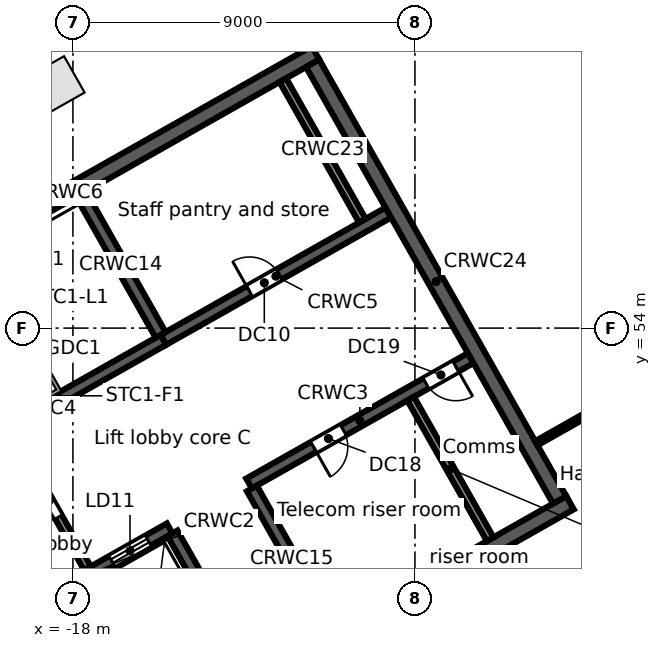
"""IFC4 building model, lengths in metres.
Left out: names, types, materials, properties, quantities, classifications, styles, units other than length and angle.
Written with IfcOpenShell. Run it as: python <this file> out.ifc"""

import sys

from ifc_helpers import new_model, si_unit, direction, frame, frame_2d, origin, origin_2d, place, context, subcontext, project, spatial, rectangle, extrude, element, fill, save


model = new_model("IFC4")
c1 = context("Model", 3, precision=1e-05, world=origin(), true_north=direction((0.0, 1.0)))
c2 = subcontext(c1, "Body", "Model", "MODEL_VIEW")
j1 = project(units=[si_unit("LENGTHUNIT", "METRE"), si_unit("PLANEANGLEUNIT", "RADIAN")], contexts=[c1])
p1 = place(None, origin())
s1 = spatial("IfcSite", under=j1, at=p1, CompositionType="ELEMENT")
p2 = place(p1, origin())
s2 = spatial("IfcBuilding", under=s1, at=p2, CompositionType="ELEMENT")
p3 = place(p2, frame((0.0, 0.0, 274.1)))
s3 = spatial("IfcBuildingStorey", under=s2, at=p3, CompositionType="ELEMENT", Elevation=274.1)
p4 = place(p3, frame((-18.441, 60.406, 0.0), z_axis=(0.0, 0.0, 1.0), x_axis=(-0.87035569594, -0.492423560103, 0.0)))
e1 = element("IfcColumn", 1, at=p4, inside=s3, PredefinedType="COLUMN", context=c2, shape_type="SweptSolid", body=[
    extrude(rectangle(XDim=1.1, YDim=1.1, at=origin_2d()), origin(), (0.0, 0.0, 1.0), 3.8),
])
p5 = place(p3, frame((-58.732, 38.771, 0.0), z_axis=(0.0, 0.0, 1.0), x_axis=(0.870355615581, 0.492423702137, 0.0)))
e2 = element("IfcWall", 2, at=p5, inside=s3, PredefinedType="STANDARD", context=c2, shape_type="SweptSolid", body=[
    extrude(rectangle(XDim=64.052, YDim=0.25, at=frame_2d((32.026, 0.0))), origin(), (0.0, 0.0, 1.0), 3.52),
])
p6 = place(p5, frame((61.259, 0.0, 0.8)))
e3 = element("IfcOpeningElement", 3, at=p6, cuts=e2, PredefinedType="OPENING", context=c2, shape_type="SweptSolid", body=[
    extrude(rectangle(XDim=2.4, YDim=2.2, at=frame_2d((1.2, 1.1))), frame((0.0, 0.135, 0.0), z_axis=(0.0, -1.0, 0.0), x_axis=(1.0, 0.0, 0.0)), (0.0, 0.0, 1.0), 0.27),
])
p7 = place(p5, frame((58.216, 0.0, 0.8)))
e4 = element("IfcOpeningElement", 4, at=p7, cuts=e2, PredefinedType="OPENING", context=c2, shape_type="SweptSolid", body=[
    extrude(rectangle(XDim=2.4, YDim=2.2, at=frame_2d((1.2, 1.1))), frame((0.0, 0.135, 0.0), z_axis=(0.0, -1.0, 0.0), x_axis=(1.0, 0.0, 0.0)), (0.0, 0.0, 1.0), 0.27),
])
p8 = place(p5, frame((55.173, 0.0, 0.8)))
e5 = element("IfcOpeningElement", 5, at=p8, cuts=e2, PredefinedType="OPENING", context=c2, shape_type="SweptSolid", body=[
    extrude(rectangle(XDim=2.4, YDim=2.2, at=frame_2d((1.2, 1.1))), frame((0.0, 0.135, 0.0), z_axis=(0.0, -1.0, 0.0), x_axis=(1.0, 0.0, 0.0)), (0.0, 0.0, 1.0), 0.27),
])
p9 = place(p5, frame((52.129, 0.0, 0.8)))
e6 = element("IfcOpeningElement", 6, at=p9, cuts=e2, PredefinedType="OPENING", context=c2, shape_type="SweptSolid", body=[
    extrude(rectangle(XDim=2.4, YDim=2.2, at=frame_2d((1.2, 1.1))), frame((0.0, 0.135, 0.0), z_axis=(0.0, -1.0, 0.0), x_axis=(1.0, 0.0, 0.0)), (0.0, 0.0, 1.0), 0.27),
])
p10 = place(p5, frame((49.086, 0.0, 0.8)))
e7 = element("IfcOpeningElement", 7, at=p10, cuts=e2, PredefinedType="OPENING", context=c2, shape_type="SweptSolid", body=[
    extrude(rectangle(XDim=2.4, YDim=2.2, at=frame_2d((1.2, 1.1))), frame((0.0, 0.135, 0.0), z_axis=(0.0, -1.0, 0.0), x_axis=(1.0, 0.0, 0.0)), (0.0, 0.0, 1.0), 0.27),
])
p11 = place(p5, frame((46.043, 0.0, 0.8)))
e8 = element("IfcOpeningElement", 8, at=p11, cuts=e2, PredefinedType="OPENING", context=c2, shape_type="SweptSolid", body=[
    extrude(rectangle(XDim=2.4, YDim=2.2, at=frame_2d((1.2, 1.1))), frame((0.0, 0.135, 0.0), z_axis=(0.0, -1.0, 0.0), x_axis=(1.0, 0.0, 0.0)), (0.0, 0.0, 1.0), 0.27),
])
p12 = place(p5, frame((43.0, 0.0, 0.8)))
e9 = element("IfcOpeningElement", 9, at=p12, cuts=e2, PredefinedType="OPENING", context=c2, shape_type="SweptSolid", body=[
    extrude(rectangle(XDim=2.4, YDim=2.2, at=frame_2d((1.2, 1.1))), frame((0.0, 0.135, 0.0), z_axis=(0.0, -1.0, 0.0), x_axis=(1.0, 0.0, 0.0)), (0.0, 0.0, 1.0), 0.27),
])
p13 = place(p5, frame((39.956, 0.0, 0.8)))
e10 = element("IfcOpeningElement", 10, at=p13, cuts=e2, PredefinedType="OPENING", context=c2, shape_type="SweptSolid", body=[
    extrude(rectangle(XDim=2.4, YDim=2.2, at=frame_2d((1.2, 1.1))), frame((0.0, 0.135, 0.0), z_axis=(0.0, -1.0, 0.0), x_axis=(1.0, 0.0, 0.0)), (0.0, 0.0, 1.0), 0.27),
])
p14 = place(p5, frame((36.913, 0.0, 0.8)))
e11 = element("IfcOpeningElement", 11, at=p14, cuts=e2, PredefinedType="OPENING", context=c2, shape_type="SweptSolid", body=[
    extrude(rectangle(XDim=2.4, YDim=2.2, at=frame_2d((1.2, 1.1))), frame((0.0, 0.135, 0.0), z_axis=(0.0, -1.0, 0.0), x_axis=(1.0, 0.0, 0.0)), (0.0, 0.0, 1.0), 0.27),
])
p15 = place(p5, frame((33.87, 0.0, 0.8)))
e12 = element("IfcOpeningElement", 12, at=p15, cuts=e2, PredefinedType="OPENING", context=c2, shape_type="SweptSolid", body=[
    extrude(rectangle(XDim=2.4, YDim=2.2, at=frame_2d((1.2, 1.1))), frame((0.0, 0.135, 0.0), z_axis=(0.0, -1.0, 0.0), x_axis=(1.0, 0.0, 0.0)), (0.0, 0.0, 1.0), 0.27),
])
p16 = place(p5, frame((30.826, 0.0, 0.8)))
e13 = element("IfcOpeningElement", 13, at=p16, cuts=e2, PredefinedType="OPENING", context=c2, shape_type="SweptSolid", body=[
    extrude(rectangle(XDim=2.4, YDim=2.2, at=frame_2d((1.2, 1.1))), frame((0.0, 0.135, 0.0), z_axis=(0.0, -1.0, 0.0), x_axis=(1.0, 0.0, 0.0)), (0.0, 0.0, 1.0), 0.27),
])
p17 = place(p5, frame((27.783, 0.0, 0.8)))
e14 = element("IfcOpeningElement", 14, at=p17, cuts=e2, PredefinedType="OPENING", context=c2, shape_type="SweptSolid", body=[
    extrude(rectangle(XDim=2.4, YDim=2.2, at=frame_2d((1.2, 1.1))), frame((0.0, 0.135, 0.0), z_axis=(0.0, -1.0, 0.0), x_axis=(1.0, 0.0, 0.0)), (0.0, 0.0, 1.0), 0.27),
])
p18 = place(p5, frame((24.74, 0.0, 0.8)))
e15 = element("IfcOpeningElement", 15, at=p18, cuts=e2, PredefinedType="OPENING", context=c2, shape_type="SweptSolid", body=[
    extrude(rectangle(XDim=2.4, YDim=2.2, at=frame_2d((1.2, 1.1))), frame((0.0, 0.135, 0.0), z_axis=(0.0, -1.0, 0.0), x_axis=(1.0, 0.0, 0.0)), (0.0, 0.0, 1.0), 0.27),
])
p19 = place(p5, frame((21.696, 0.0, 0.8)))
e16 = element("IfcOpeningElement", 16, at=p19, cuts=e2, PredefinedType="OPENING", context=c2, shape_type="SweptSolid", body=[
    extrude(rectangle(XDim=2.4, YDim=2.2, at=frame_2d((1.2, 1.1))), frame((0.0, 0.135, 0.0), z_axis=(0.0, -1.0, 0.0), x_axis=(1.0, 0.0, 0.0)), (0.0, 0.0, 1.0), 0.27),
])
p20 = place(p5, frame((18.653, 0.0, 0.8)))
e17 = element("IfcOpeningElement", 17, at=p20, cuts=e2, PredefinedType="OPENING", context=c2, shape_type="SweptSolid", body=[
    extrude(rectangle(XDim=2.4, YDim=2.2, at=frame_2d((1.2, 1.1))), frame((0.0, 0.135, 0.0), z_axis=(0.0, -1.0, 0.0), x_axis=(1.0, 0.0, 0.0)), (0.0, 0.0, 1.0), 0.27),
])
p21 = place(p5, frame((15.61, 0.0, 0.8)))
e18 = element("IfcOpeningElement", 18, at=p21, cuts=e2, PredefinedType="OPENING", context=c2, shape_type="SweptSolid", body=[
    extrude(rectangle(XDim=2.4, YDim=2.2, at=frame_2d((1.2, 1.1))), frame((0.0, 0.135, 0.0), z_axis=(0.0, -1.0, 0.0), x_axis=(1.0, 0.0, 0.0)), (0.0, 0.0, 1.0), 0.27),
])
p22 = place(p5, frame((12.567, 0.0, 0.8)))
e19 = element("IfcOpeningElement", 19, at=p22, cuts=e2, PredefinedType="OPENING", context=c2, shape_type="SweptSolid", body=[
    extrude(rectangle(XDim=2.4, YDim=2.2, at=frame_2d((1.2, 1.1))), frame((0.0, 0.135, 0.0), z_axis=(0.0, -1.0, 0.0), x_axis=(1.0, 0.0, 0.0)), (0.0, 0.0, 1.0), 0.27),
])
p23 = place(p5, frame((9.523, 0.0, 0.8)))
e20 = element("IfcOpeningElement", 20, at=p23, cuts=e2, PredefinedType="OPENING", context=c2, shape_type="SweptSolid", body=[
    extrude(rectangle(XDim=2.4, YDim=2.2, at=frame_2d((1.2, 1.1))), frame((0.0, 0.135, 0.0), z_axis=(0.0, -1.0, 0.0), x_axis=(1.0, 0.0, 0.0)), (0.0, 0.0, 1.0), 0.27),
])
p24 = place(p5, frame((6.48, 0.0, 0.8)))
e21 = element("IfcOpeningElement", 21, at=p24, cuts=e2, PredefinedType="OPENING", context=c2, shape_type="SweptSolid", body=[
    extrude(rectangle(XDim=2.4, YDim=2.2, at=frame_2d((1.2, 1.1))), frame((0.0, 0.135, 0.0), z_axis=(0.0, -1.0, 0.0), x_axis=(1.0, 0.0, 0.0)), (0.0, 0.0, 1.0), 0.27),
])
p25 = place(p5, frame((3.437, 0.0, 0.8)))
e22 = element("IfcOpeningElement", 22, at=p25, cuts=e2, PredefinedType="OPENING", context=c2, shape_type="SweptSolid", body=[
    extrude(rectangle(XDim=2.4, YDim=2.2, at=frame_2d((1.2, 1.1))), frame((0.0, 0.135, 0.0), z_axis=(0.0, -1.0, 0.0), x_axis=(1.0, 0.0, 0.0)), (0.0, 0.0, 1.0), 0.27),
])
p26 = place(p5, frame((0.393, 0.0, 0.8)))
e23 = element("IfcOpeningElement", 23, at=p26, cuts=e2, PredefinedType="OPENING", context=c2, shape_type="SweptSolid", body=[
    extrude(rectangle(XDim=2.4, YDim=2.2, at=frame_2d((1.2, 1.1))), frame((0.0, 0.135, 0.0), z_axis=(0.0, -1.0, 0.0), x_axis=(1.0, 0.0, 0.0)), (0.0, 0.0, 1.0), 0.27),
])
p27 = place(p3, frame((-17.975, 42.017, 0.0), z_axis=(0.0, 0.0, 1.0), x_axis=(0.87034965173, 0.492434243055, 0.0)))
e24 = element("IfcWall", 24, at=p27, inside=s3, PredefinedType="SOLIDWALL", context=c2, shape_type="SweptSolid", body=[
    extrude(rectangle(XDim=15.0, YDim=0.4, at=frame_2d((7.5, 0.0))), origin(), (0.0, 0.0, 1.0), 3.52),
])
p28 = place(p27, frame((6.1, 0.0, 0.0)))
e25 = element("IfcOpeningElement", 25, at=p28, cuts=e24, PredefinedType="OPENING", context=c2, shape_type="SweptSolid", body=[
    extrude(rectangle(XDim=1.2, YDim=2.1, at=frame_2d((0.6, 1.05))), frame((0.0, 0.21, 0.0), z_axis=(0.0, -1.0, 0.0), x_axis=(1.0, 0.0, 0.0)), (0.0, 0.0, 1.0), 0.42),
])
p29 = place(p3, frame((-19.892, 46.218, 0.0), z_axis=(0.0, 0.0, 1.0), x_axis=(0.870341639186, 0.492448404505, 0.0)))
e26 = element("IfcWall", 26, at=p29, inside=s3, PredefinedType="SOLIDWALL", context=c2, shape_type="SweptSolid", body=[
    extrude(rectangle(XDim=5.1, YDim=0.3, at=frame_2d((2.55, 0.0))), origin(), (0.0, 0.0, 1.0), 3.52),
])
p30 = place(p29, frame((0.75, 0.0, 0.0)))
e27 = element("IfcOpeningElement", 27, at=p30, cuts=e26, PredefinedType="OPENING", context=c2, shape_type="SweptSolid", body=[
    extrude(rectangle(XDim=1.1, YDim=2.1, at=frame_2d((0.55, 1.05))), frame((0.0, 0.16, 0.0), z_axis=(0.0, -1.0, 0.0), x_axis=(1.0, 0.0, 0.0)), (0.0, 0.0, 1.0), 0.32),
])
p31 = place(p29, frame((3.35, 0.0, 0.0)))
e28 = element("IfcOpeningElement", 28, at=p31, cuts=e26, PredefinedType="OPENING", context=c2, shape_type="SweptSolid", body=[
    extrude(rectangle(XDim=1.1, YDim=2.1, at=frame_2d((0.55, 1.05))), frame((0.0, 0.16, 0.0), z_axis=(0.0, -1.0, 0.0), x_axis=(1.0, 0.0, 0.0)), (0.0, 0.0, 1.0), 0.32),
])
p32 = place(p3, frame((-13.365, 49.911, 0.0), z_axis=(0.0, 0.0, 1.0), x_axis=(0.870347618718, 0.492437836272, 0.0)))
e29 = element("IfcWall", 29, at=p32, inside=s3, PredefinedType="SOLIDWALL", context=c2, shape_type="SweptSolid", body=[
    extrude(rectangle(XDim=6.7, YDim=0.3, at=frame_2d((3.35, 0.0))), origin(), (0.0, 0.0, 1.0), 3.52),
])
p33 = place(p32, frame((1.95, 0.0, 0.0)))
e30 = element("IfcOpeningElement", 30, at=p33, cuts=e29, PredefinedType="OPENING", context=c2, shape_type="SweptSolid", body=[
    extrude(rectangle(XDim=0.9, YDim=2.1, at=frame_2d((0.45, 1.05))), frame((0.0, 0.16, 0.0), z_axis=(0.0, -1.0, 0.0), x_axis=(1.0, 0.0, 0.0)), (0.0, 0.0, 1.0), 0.32),
])
p34 = place(p32, frame((5.35, 0.0, 0.0)))
e31 = element("IfcOpeningElement", 31, at=p34, cuts=e29, PredefinedType="OPENING", context=c2, shape_type="SweptSolid", body=[
    extrude(rectangle(XDim=0.9, YDim=2.1, at=frame_2d((0.45, 1.05))), frame((0.0, 0.16, 0.0), z_axis=(0.0, -1.0, 0.0), x_axis=(1.0, 0.0, 0.0)), (0.0, 0.0, 1.0), 0.32),
])
p35 = place(p3, frame((-22.059, 50.047, 0.0), z_axis=(0.0, 0.0, 1.0), x_axis=(0.87035077051, 0.49243226567, 0.0)))
e32 = element("IfcWall", 32, at=p35, inside=s3, PredefinedType="SOLIDWALL", context=c2, shape_type="SweptSolid", body=[
    extrude(rectangle(XDim=7.4, YDim=0.3, at=frame_2d((3.7, 0.0))), origin(), (0.0, 0.0, 1.0), 3.52),
])
p36 = place(p35, frame((0.4, 0.0, 0.0)))
e33 = element("IfcOpeningElement", 33, at=p36, cuts=e32, PredefinedType="OPENING", context=c2, shape_type="SweptSolid", body=[
    extrude(rectangle(XDim=1.0, YDim=2.1, at=frame_2d((0.5, 1.05))), frame((0.0, 0.16, 0.0), z_axis=(0.0, -1.0, 0.0), x_axis=(1.0, 0.0, 0.0)), (0.0, 0.0, 1.0), 0.32),
])
p37 = place(p3, frame((-15.618, 53.691, 0.0), z_axis=(0.0, 0.0, 1.0), x_axis=(0.870362830851, 0.492410948978, 0.0)))
e34 = element("IfcWall", 34, at=p37, inside=s3, PredefinedType="SOLIDWALL", context=c2, shape_type="SweptSolid", body=[
    extrude(rectangle(XDim=6.8, YDim=0.3, at=frame_2d((3.4, 0.0))), origin(), (0.0, 0.0, 1.0), 3.52),
])
p38 = place(p37, frame((2.6, 0.0, 0.0)))
e35 = element("IfcOpeningElement", 35, at=p38, cuts=e34, PredefinedType="OPENING", context=c2, shape_type="SweptSolid", body=[
    extrude(rectangle(XDim=0.9, YDim=2.1, at=frame_2d((0.45, 1.05))), frame((0.0, 0.16, 0.0), z_axis=(0.0, -1.0, 0.0), x_axis=(1.0, 0.0, 0.0)), (0.0, 0.0, 1.0), 0.32),
])
p39 = place(p3, frame((-24.672, 53.854, 0.0), z_axis=(0.0, 0.0, 1.0), x_axis=(0.870353598469, 0.492427267353, 0.0)))
e36 = element("IfcWall", 36, at=p39, inside=s3, PredefinedType="SOLIDWALL", context=c2, shape_type="SweptSolid", body=[
    extrude(rectangle(XDim=15.0, YDim=0.4, at=frame_2d((7.5, 0.0))), origin(), (0.0, 0.0, 1.0), 3.52),
])
p40 = place(p3, frame((-24.4, 53.779, 0.0), z_axis=(0.0, 0.0, 1.0), x_axis=(0.492421663121, -0.870356769198, 0.0)))
e37 = element("IfcWall", 37, at=p40, inside=s3, PredefinedType="SOLIDWALL", context=c2, shape_type="SweptSolid", body=[
    extrude(rectangle(XDim=13.2, YDim=0.4, at=frame_2d((6.6, 0.0))), origin(), (0.0, 0.0, 1.0), 3.52),
])
p41 = place(p3, frame((-19.635, 51.246, 0.0), z_axis=(0.0, 0.0, 1.0), x_axis=(0.492408451753, -0.87036424366, 0.0)))
e38 = element("IfcWall", 38, at=p41, inside=s3, PredefinedType="PARTITIONING", context=c2, shape_type="SweptSolid", body=[
    extrude(rectangle(XDim=4.1, YDim=0.2, at=frame_2d((2.05, 0.0))), origin(), (0.0, 0.0, 1.0), 3.52),
])
p42 = place(p41, frame((1.55, 0.0, 0.0)))
e39 = element("IfcOpeningElement", 39, at=p42, cuts=e38, PredefinedType="OPENING", context=c2, shape_type="SweptSolid", body=[
    extrude(rectangle(XDim=1.0, YDim=2.1, at=frame_2d((0.5, 1.05))), frame((0.0, 0.11, 0.0), z_axis=(0.0, -1.0, 0.0), x_axis=(1.0, 0.0, 0.0)), (0.0, 0.0, 1.0), 0.22),
])
for number, where, z_axis, x_axis in (
    (40, (-15.379, 48.599, 0.0), (0.0, 0.0, 1.0), (0.492, -0.87, 0.0)),
    (41, (-17.785, 57.521, 0.0), (0.0, 0.0, 1.0), (0.492, -0.87, 0.0)),
):
    element("IfcWall", number, at=place(p3, frame(where, z_axis=z_axis, x_axis=x_axis)), inside=s3, PredefinedType="SOLIDWALL", context=c2, shape_type="SweptSolid", body=[
        extrude(rectangle(XDim=4.25, YDim=0.3, at=frame_2d((2.125, 0.0))), origin(), (0.0, 0.0, 1.0), 3.52),
    ])
p43 = place(p3, frame((-13.291, 49.781, 0.0), z_axis=(0.0, 0.0, 1.0), x_axis=(0.492397924348, -0.870370199454, 0.0)))
e42 = element("IfcWall", 42, at=p43, inside=s3, PredefinedType="SOLIDWALL", context=c2, shape_type="SweptSolid", body=[
    extrude(rectangle(XDim=4.25, YDim=0.3, at=frame_2d((2.125, 0.0))), origin(), (0.0, 0.0, 1.0), 3.52),
])
p44 = place(p3, frame((-9.113, 52.144, 0.0), z_axis=(0.0, 0.0, 1.0), x_axis=(0.492422543467, -0.870356271124, 0.0)))
e43 = element("IfcWall", 43, at=p44, inside=s3, PredefinedType="PARTITIONING", context=c2, shape_type="SweptSolid", body=[
    extrude(rectangle(XDim=4.25, YDim=0.2, at=frame_2d((2.125, 0.0))), origin(), (0.0, 0.0, 1.0), 3.52),
])
p45 = place(p3, frame((-12.476, 60.525, 0.0), z_axis=(0.0, 0.0, 1.0), x_axis=(0.492422543467, -0.870356271124, 0.0)))
e44 = element("IfcWall", 44, at=p45, inside=s3, PredefinedType="SOLIDWALL", context=c2, shape_type="SweptSolid", body=[
    extrude(rectangle(XDim=4.25, YDim=0.2, at=frame_2d((2.125, 0.0))), origin(), (0.0, 0.0, 1.0), 3.52),
])
p46 = place(p3, frame((-11.692, 60.968, 0.0), z_axis=(0.0, 0.0, 1.0), x_axis=(0.492421663121, -0.870356769198, 0.0)))
e45 = element("IfcWall", 45, at=p46, inside=s3, PredefinedType="SOLIDWALL", context=c2, shape_type="SweptSolid", body=[
    extrude(rectangle(XDim=13.2, YDim=0.4, at=frame_2d((6.6, 0.0))), origin(), (0.0, 0.0, 1.0), 3.52),
])
p47 = place(p3, frame((-5.806, 50.97, 0.0), z_axis=(0.0, 0.0, 1.0), x_axis=(0.870355163327, 0.492424501492, 0.0)))
e46 = element("IfcWall", 46, at=p47, inside=s3, PredefinedType="PARTITIONING", context=c2, shape_type="SweptSolid", body=[
    extrude(rectangle(XDim=6.527, YDim=0.125, at=frame_2d((3.264, 0.0))), origin(), (0.0, 0.0, 1.0), 2.8),
])
p48 = place(p47, frame((2.45, 0.0, 0.0)))
e47 = element("IfcOpeningElement", 47, at=p48, cuts=e46, PredefinedType="OPENING", context=c2, shape_type="SweptSolid", body=[
    extrude(rectangle(XDim=1.8, YDim=2.1, at=frame_2d((0.9, 1.05))), frame((0.0, 0.073, 0.0), z_axis=(0.0, -1.0, 0.0), x_axis=(1.0, 0.0, 0.0)), (0.0, 0.0, 1.0), 0.145),
])
p49 = place(p31, origin())
e48 = element("IfcDoor", 48, at=p49, inside=s3, OperationType="DOUBLE_DOOR_SLIDING", PredefinedType="DOOR", context=c2, shape_type="SweptSolid", body=[
    extrude(rectangle(XDim=1.1, YDim=2.1, at=frame_2d((0.55, 1.05))), frame((0.0, 0.025, 0.0), z_axis=(0.0, -1.0, 0.0), x_axis=(1.0, 0.0, 0.0)), (0.0, 0.0, 1.0), 0.05),
])
fill(e28, e48)
p50 = place(p42, frame((1.0, 0.0, 0.0), z_axis=(0.0, 0.0, 1.0), x_axis=(-1.0, 0.0, 0.0)))
e49 = element("IfcDoor", 49, at=p50, inside=s3, OperationType="SINGLE_SWING_RIGHT", PredefinedType="DOOR", context=c2, shape_type="SweptSolid", body=[
    extrude(rectangle(XDim=1.0, YDim=2.1, at=frame_2d((0.5, 1.05))), frame((0.0, 0.025, 0.0), z_axis=(0.0, -1.0, 0.0), x_axis=(1.0, 0.0, 0.0)), (0.0, 0.0, 1.0), 0.05),
])
fill(e39, e49)
p51 = place(p38, origin())
e50 = element("IfcDoor", 50, at=p51, inside=s3, OperationType="SINGLE_SWING_LEFT", PredefinedType="DOOR", context=c2, shape_type="SweptSolid", body=[
    extrude(rectangle(XDim=0.9, YDim=2.1, at=frame_2d((0.45, 1.05))), frame((0.0, 0.025, 0.0), z_axis=(0.0, -1.0, 0.0), x_axis=(1.0, 0.0, 0.0)), (0.0, 0.0, 1.0), 0.05),
])
fill(e35, e50)
p52 = place(p33, frame((0.9, 0.0, 0.0), z_axis=(0.0, 0.0, 1.0), x_axis=(-1.0, 0.0, 0.0)))
e51 = element("IfcDoor", 51, at=p52, inside=s3, OperationType="SINGLE_SWING_RIGHT", PredefinedType="DOOR", context=c2, shape_type="SweptSolid", body=[
    extrude(rectangle(XDim=0.9, YDim=2.1, at=frame_2d((0.45, 1.05))), frame((0.0, 0.025, 0.0), z_axis=(0.0, -1.0, 0.0), x_axis=(1.0, 0.0, 0.0)), (0.0, 0.0, 1.0), 0.05),
])
fill(e30, e51)
p53 = place(p34, frame((0.9, 0.0, 0.0), z_axis=(0.0, 0.0, 1.0), x_axis=(-1.0, 0.0, 0.0)))
e52 = element("IfcDoor", 52, at=p53, inside=s3, OperationType="SINGLE_SWING_LEFT", PredefinedType="DOOR", context=c2, shape_type="SweptSolid", body=[
    extrude(rectangle(XDim=0.9, YDim=2.1, at=frame_2d((0.45, 1.05))), frame((0.0, 0.025, 0.0), z_axis=(0.0, -1.0, 0.0), x_axis=(1.0, 0.0, 0.0)), (0.0, 0.0, 1.0), 0.05),
])
fill(e31, e52)
save(model, sys.argv[1])
